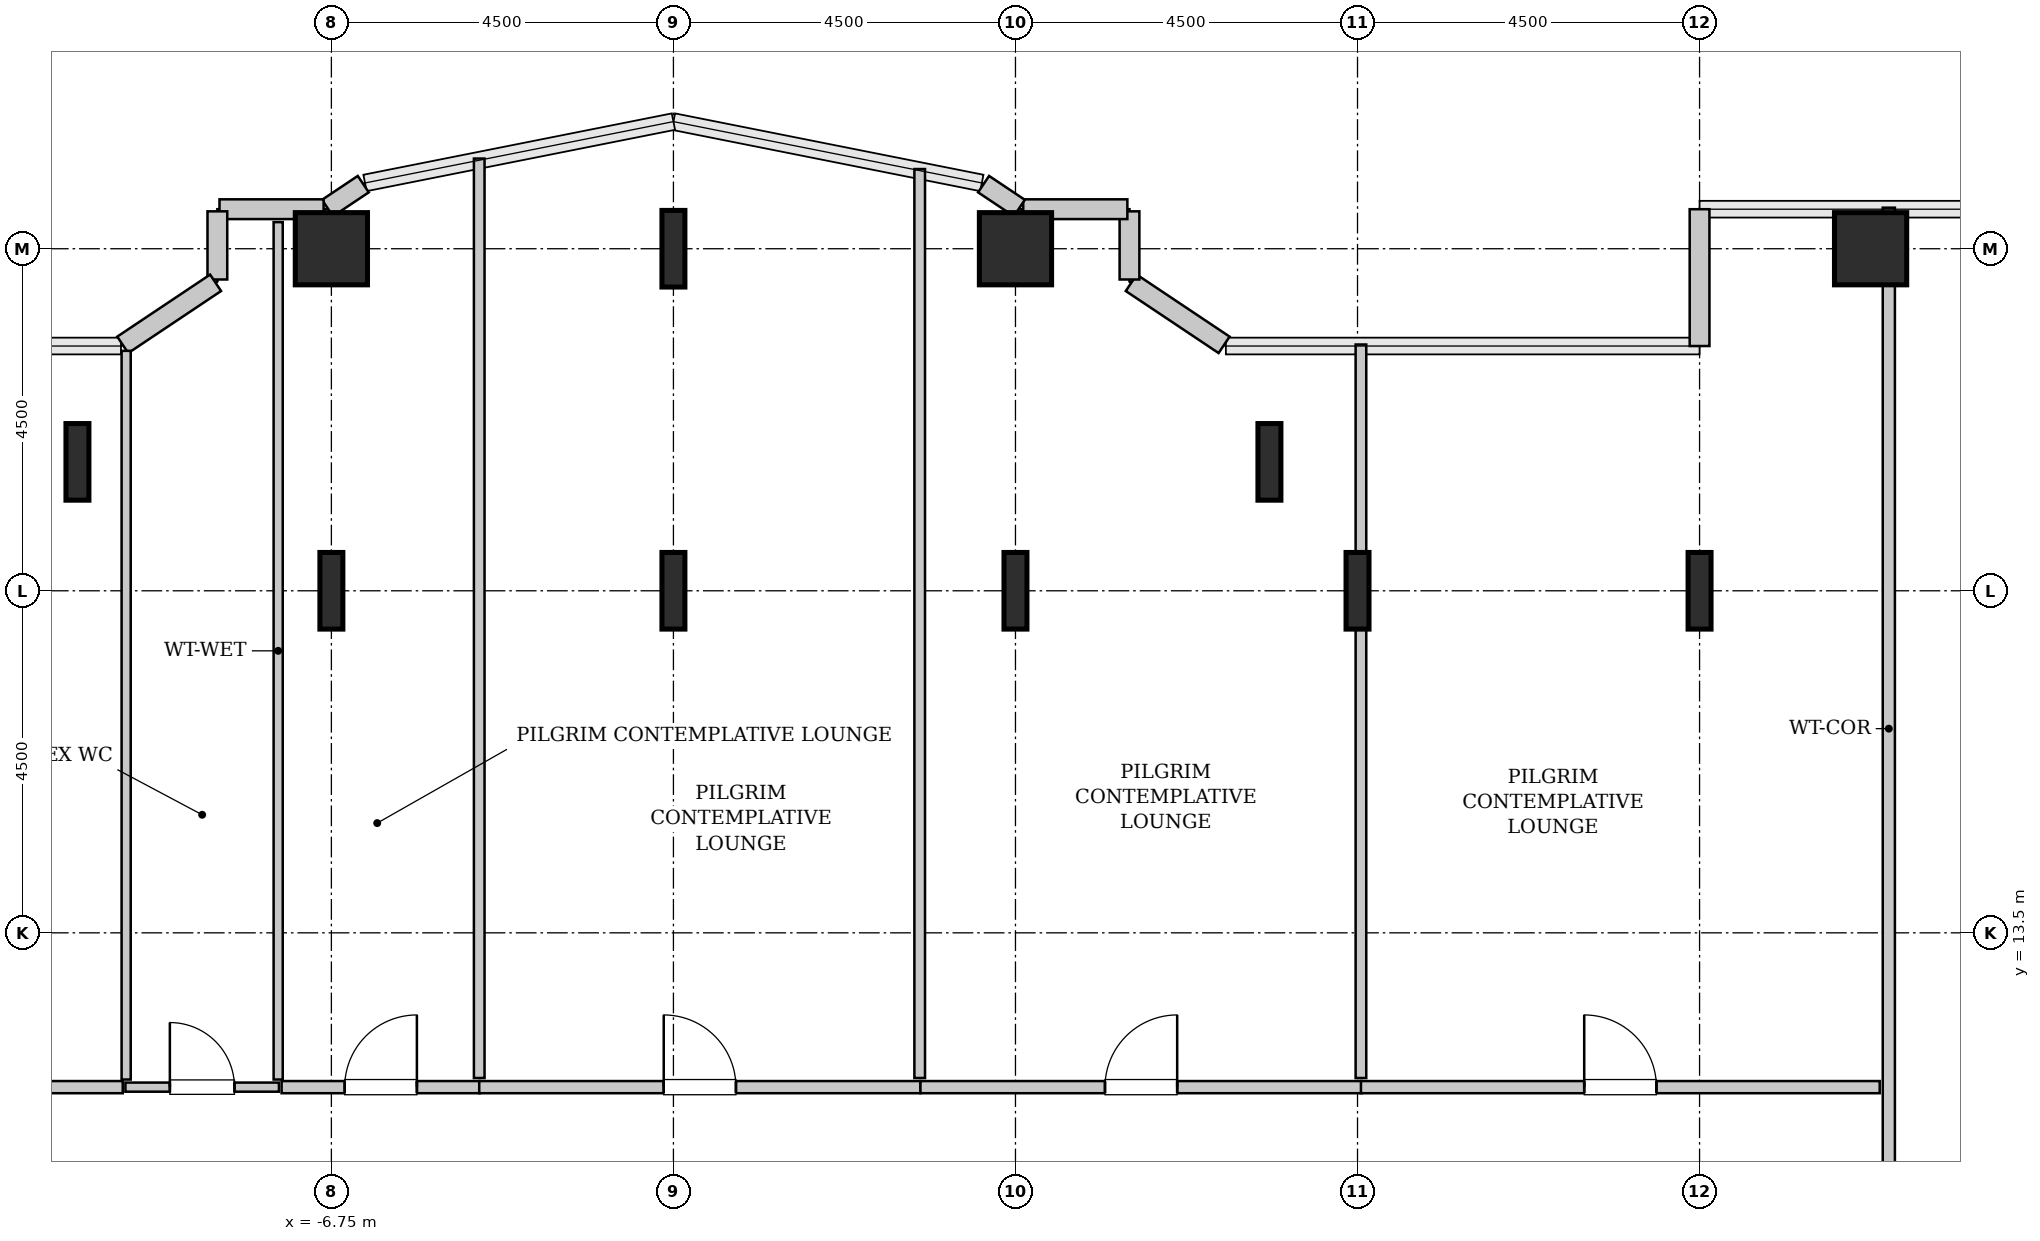
"""IFC4 building model, lengths in metres.
Left out: names, types, materials, properties, quantities, classifications, styles, units other than length and angle.
Written with IfcOpenShell. Run it as: python <this file> out.ifc"""

import sys

from ifc_helpers import new_model, si_unit, direction, frame, frame_2d, origin, origin_2d, place, context, subcontext, project, spatial, rectangle, hollow_rectangle, i_section, extrude, source, transform, mapped, element, fill, save


model = new_model("IFC4")
c1 = context("Model", 3, precision=1e-05, world=origin(), true_north=direction((0.0, 1.0)))
c2 = subcontext(c1, "Body", "Model", "MODEL_VIEW")
j1 = project(units=[si_unit("LENGTHUNIT", "METRE"), si_unit("PLANEANGLEUNIT", "RADIAN")], contexts=[c1])
p1 = place(None, origin())
s1 = spatial("IfcSite", under=j1, at=p1, CompositionType="ELEMENT")
p2 = place(p1, origin())
s2 = spatial("IfcBuilding", under=s1, at=p2, CompositionType="ELEMENT")
p3 = place(p2, frame((0.0, 0.0, 52.0)))
s3 = spatial("IfcBuildingStorey", under=s2, at=p3, CompositionType="ELEMENT", Elevation=52.0)
m1 = source(origin(), c2, "Body", "SweptSolid", [
    extrude(i_section(OverallWidth=0.302, OverallDepth=1.008, WebThickness=0.021, FlangeThickness=0.04, FilletRadius=0.03, at=origin_2d()), origin(), (0.0, 0.0, 1.0), 3.8),
])
for number, where, z_axis, x_axis in (
    (1, (-10.091, 19.696, 0.0), (0.0, 0.0, 1.0), (1.0, 0.0, 0.0)),
    (2, (-6.75, 18.0, 0.0), (0.0, 0.0, 1.0), (1.0, 0.0, 0.0)),
):
    element("IfcColumn", number, at=place(p3, frame(where, z_axis=z_axis, x_axis=x_axis)), inside=s3, PredefinedType="COLUMN", context=c2, shape_type="MappedRepresentation", body=[
        mapped(m1, transform((0.0, 0.0, 0.0), x_axis=(1.0, 0.0, 0.0), y_axis=(0.0, 1.0, 0.0), z_axis=(0.0, 0.0, 1.0), scale=1.0)),
    ])
m2 = source(origin(), c2, "Body", "SweptSolid", [
    extrude(hollow_rectangle(XDim=0.95, YDim=0.95, WallThickness=0.045, InnerFilletRadius=0.045, OuterFilletRadius=0.09, at=origin_2d()), origin(), (0.0, 0.0, 1.0), 3.8),
])
p4 = place(p3, frame((-6.75, 22.5, 0.0), z_axis=(0.0, 0.0, 1.0), x_axis=(1.0, 0.0, 0.0)))
e3 = element("IfcColumn", 3, at=p4, inside=s3, PredefinedType="COLUMN", context=c2, shape_type="MappedRepresentation", body=[
    mapped(m2, transform((0.0, 0.0, 0.0), x_axis=(1.0, 0.0, 0.0), y_axis=(0.0, 1.0, 0.0), z_axis=(0.0, 0.0, 1.0), scale=1.0)),
])
for number, where, z_axis, x_axis in (
    (4, (-2.25, 18.0, 0.0), (0.0, 0.0, 1.0), (1.0, 0.0, 0.0)),
    (5, (-2.25, 22.5, 0.0), (0.0, 0.0, 1.0), (1.0, 0.0, 0.0)),
    (6, (2.25, 18.0, 0.0), (0.0, 0.0, 1.0), (1.0, 0.0, 0.0)),
):
    element("IfcColumn", number, at=place(p3, frame(where, z_axis=z_axis, x_axis=x_axis)), inside=s3, PredefinedType="COLUMN", context=c2, shape_type="MappedRepresentation", body=[
        mapped(m1, transform((0.0, 0.0, 0.0), x_axis=(1.0, 0.0, 0.0), y_axis=(0.0, 1.0, 0.0), z_axis=(0.0, 0.0, 1.0), scale=1.0)),
    ])
p5 = place(p3, frame((2.25, 22.5, 0.0), z_axis=(0.0, 0.0, 1.0), x_axis=(1.0, 0.0, 0.0)))
e7 = element("IfcColumn", 7, at=p5, inside=s3, PredefinedType="COLUMN", context=c2, shape_type="MappedRepresentation", body=[
    mapped(m2, transform((0.0, 0.0, 0.0), x_axis=(1.0, 0.0, 0.0), y_axis=(0.0, 1.0, 0.0), z_axis=(0.0, 0.0, 1.0), scale=1.0)),
])
for number, where, z_axis, x_axis in (
    (8, (5.591, 19.696, 0.0), (0.0, 0.0, 1.0), (1.0, 0.0, 0.0)),
    (9, (6.75, 18.0, 0.0), (0.0, 0.0, 1.0), (1.0, 0.0, 0.0)),
    (10, (11.25, 18.0, 0.0), (0.0, 0.0, 1.0), (1.0, 0.0, 0.0)),
):
    element("IfcColumn", number, at=place(p3, frame(where, z_axis=z_axis, x_axis=x_axis)), inside=s3, PredefinedType="COLUMN", context=c2, shape_type="MappedRepresentation", body=[
        mapped(m1, transform((0.0, 0.0, 0.0), x_axis=(1.0, 0.0, 0.0), y_axis=(0.0, 1.0, 0.0), z_axis=(0.0, 0.0, 1.0), scale=1.0)),
    ])
p6 = place(p3, frame((13.5, 22.5, 0.0), z_axis=(0.0, 0.0, 1.0), x_axis=(1.0, 0.0, 0.0)))
e11 = element("IfcColumn", 11, at=p6, inside=s3, PredefinedType="COLUMN", context=c2, shape_type="MappedRepresentation", body=[
    mapped(m2, transform((0.0, 0.0, 0.0), x_axis=(1.0, 0.0, 0.0), y_axis=(0.0, 1.0, 0.0), z_axis=(0.0, 0.0, 1.0), scale=1.0)),
])
m3 = source(origin(), c2, "Body", "SweptSolid", [
    extrude(rectangle(XDim=1.8, YDim=0.26, at=frame_2d((0.9, 0.0))), origin(), (0.0, 0.0, 1.0), 3.55),
])
p7 = place(p3, frame((11.25, 23.02, 0.0), z_axis=(0.0, 0.0, 1.0), x_axis=(0.0, -1.0, 0.0)))
e12 = element("IfcWall", 12, at=p7, inside=s3, PredefinedType="SOLIDWALL", context=c2, shape_type="MappedRepresentation", body=[
    mapped(m3, transform((0.0, 0.0, 0.0), x_axis=(1.0, 0.0, 0.0), y_axis=(0.0, 1.0, 0.0), z_axis=(0.0, 0.0, 1.0), scale=1.0)),
])
m4 = source(origin(), c2, "Body", "SweptSolid", [
    extrude(rectangle(XDim=1.469, YDim=0.26, at=frame_2d((0.734, 0.0))), origin(), (0.0, 0.0, 1.0), 3.55),
])
p8 = place(p3, frame((4.995, 21.236, 0.0), z_axis=(0.0, 0.0, 1.0), x_axis=(-0.831461760506, 0.555581983884, 0.0)))
e13 = element("IfcWall", 13, at=p8, inside=s3, PredefinedType="SOLIDWALL", context=c2, shape_type="MappedRepresentation", body=[
    mapped(m4, transform((0.0, 0.0, 0.0), x_axis=(1.0, 0.0, 0.0), y_axis=(0.0, 1.0, 0.0), z_axis=(0.0, 0.0, 1.0), scale=1.0)),
])
m5 = source(origin(), c2, "Body", "SweptSolid", [
    extrude(rectangle(XDim=0.897, YDim=0.26, at=frame_2d((0.448, 0.0))), origin(), (0.0, 0.0, 1.0), 3.55),
])
p9 = place(p3, frame((3.75, 22.095, 0.0), z_axis=(0.0, 0.0, 1.0), x_axis=(0.0, 1.0, 0.0)))
e14 = element("IfcWall", 14, at=p9, inside=s3, PredefinedType="SOLIDWALL", context=c2, shape_type="MappedRepresentation", body=[
    mapped(m5, transform((0.0, 0.0, 0.0), x_axis=(1.0, 0.0, 0.0), y_axis=(0.0, 1.0, 0.0), z_axis=(0.0, 0.0, 1.0), scale=1.0)),
])
m6 = source(origin(), c2, "Body", "SweptSolid", [
    extrude(rectangle(XDim=1.37, YDim=0.26, at=frame_2d((0.685, 0.0))), origin(), (0.0, 0.0, 1.0), 3.55),
])
p10 = place(p3, frame((3.722, 23.02, 0.0), z_axis=(0.0, 0.0, 1.0), x_axis=(-1.0, 0.0, 0.0)))
e15 = element("IfcWall", 15, at=p10, inside=s3, PredefinedType="SOLIDWALL", context=c2, shape_type="MappedRepresentation", body=[
    mapped(m6, transform((0.0, 0.0, 0.0), x_axis=(1.0, 0.0, 0.0), y_axis=(0.0, 1.0, 0.0), z_axis=(0.0, 0.0, 1.0), scale=1.0)),
])
m7 = source(origin(), c2, "Body", "SweptSolid", [
    extrude(rectangle(XDim=0.565, YDim=0.26, at=frame_2d((0.283, 0.0))), origin(), (0.0, 0.0, 1.0), 3.55),
])
for number, where, z_axis, x_axis in (
    (16, (2.301, 23.036, 0.0), (0.0, 0.0, 1.0), (-0.832, 0.555, 0.0)),
    (17, (-6.331, 23.35, 0.0), (0.0, 0.0, 1.0), (-0.832, -0.555, 0.0)),
):
    element("IfcWall", number, at=place(p3, frame(where, z_axis=z_axis, x_axis=x_axis)), inside=s3, PredefinedType="SOLIDWALL", context=c2, shape_type="MappedRepresentation", body=[
        mapped(m7, transform((0.0, 0.0, 0.0), x_axis=(1.0, 0.0, 0.0), y_axis=(0.0, 1.0, 0.0), z_axis=(0.0, 0.0, 1.0), scale=1.0)),
    ])
p11 = place(p3, frame((-6.852, 23.02, 0.0), z_axis=(0.0, 0.0, 1.0), x_axis=(-1.0, 0.0, 0.0)))
e18 = element("IfcWall", 18, at=p11, inside=s3, PredefinedType="SOLIDWALL", context=c2, shape_type="MappedRepresentation", body=[
    mapped(m6, transform((0.0, 0.0, 0.0), x_axis=(1.0, 0.0, 0.0), y_axis=(0.0, 1.0, 0.0), z_axis=(0.0, 0.0, 1.0), scale=1.0)),
])
p12 = place(p3, frame((-8.25, 22.992, 0.0), z_axis=(0.0, 0.0, 1.0), x_axis=(0.0, -1.0, 0.0)))
e19 = element("IfcWall", 19, at=p12, inside=s3, PredefinedType="SOLIDWALL", context=c2, shape_type="MappedRepresentation", body=[
    mapped(m5, transform((0.0, 0.0, 0.0), x_axis=(1.0, 0.0, 0.0), y_axis=(0.0, 1.0, 0.0), z_axis=(0.0, 0.0, 1.0), scale=1.0)),
])
p13 = place(p3, frame((-8.273, 22.052, 0.0), z_axis=(0.0, 0.0, 1.0), x_axis=(-0.831461760506, -0.555581983884, 0.0)))
e20 = element("IfcWall", 20, at=p13, inside=s3, PredefinedType="SOLIDWALL", context=c2, shape_type="MappedRepresentation", body=[
    mapped(m4, transform((0.0, 0.0, 0.0), x_axis=(1.0, 0.0, 0.0), y_axis=(0.0, 1.0, 0.0), z_axis=(0.0, 0.0, 1.0), scale=1.0)),
])
m8 = source(origin(), c2, "Body", "SweptSolid", [
    extrude(rectangle(XDim=2.02, YDim=0.12, at=frame_2d((1.01, 0.0))), origin(), (0.0, 0.0, 1.0), 3.535),
])
p14 = place(p3, frame((-9.46, 11.47, 0.0), z_axis=(0.0, 0.0, 1.0), x_axis=(1.0, 0.0, 0.0)))
e21 = element("IfcWall", 21, at=p14, inside=s3, PredefinedType="PLUMBINGWALL", context=c2, shape_type="MappedRepresentation", body=[
    mapped(m8, transform((0.0, 0.0, 0.0), x_axis=(1.0, 0.0, 0.0), y_axis=(0.0, 1.0, 0.0), z_axis=(0.0, 0.0, 1.0), scale=1.0)),
])
p15 = place(p14, frame((0.585, 0.0, 0.0)))
e22 = element("IfcOpeningElement", 22, at=p15, cuts=e21, PredefinedType="OPENING", context=c2, shape_type="SweptSolid", body=[
    extrude(rectangle(XDim=0.85, YDim=2.1, at=frame_2d((0.425, 1.05))), frame((0.0, 0.07, 0.0), z_axis=(0.0, -1.0, 0.0), x_axis=(1.0, 0.0, 0.0)), (0.0, 0.0, 1.0), 0.14),
])
m9 = source(origin(), c2, "Body", "SweptSolid", [
    extrude(rectangle(XDim=11.28, YDim=0.12, at=frame_2d((5.64, 0.0))), origin(), (0.0, 0.0, 1.0), 3.535),
])
p16 = place(p3, frame((-7.45, 11.57, 0.0), z_axis=(0.0, 0.0, 1.0), x_axis=(0.0, 1.0, 0.0)))
e23 = element("IfcWall", 23, at=p16, inside=s3, PredefinedType="PLUMBINGWALL", context=c2, shape_type="MappedRepresentation", body=[
    mapped(m9, transform((0.0, 0.0, 0.0), x_axis=(1.0, 0.0, 0.0), y_axis=(0.0, 1.0, 0.0), z_axis=(0.0, 0.0, 1.0), scale=1.0)),
])
m10 = source(origin(), c2, "Body", "SweptSolid", [
    extrude(rectangle(XDim=9.587, YDim=0.12, at=frame_2d((4.793, 0.0))), origin(), (0.0, 0.0, 1.0), 3.535),
])
p17 = place(p3, frame((-9.45, 11.57, 0.0), z_axis=(0.0, 0.0, 1.0), x_axis=(0.0, 1.0, 0.0)))
e24 = element("IfcWall", 24, at=p17, inside=s3, PredefinedType="PLUMBINGWALL", context=c2, shape_type="MappedRepresentation", body=[
    mapped(m10, transform((0.0, 0.0, 0.0), x_axis=(1.0, 0.0, 0.0), y_axis=(0.0, 1.0, 0.0), z_axis=(0.0, 0.0, 1.0), scale=1.0)),
])
m11 = source(origin(), c2, "Body", "SweptSolid", [
    extrude(rectangle(XDim=16.735, YDim=0.16, at=frame_2d((8.368, 0.0))), origin(), (0.0, 0.0, 1.0), 3.535),
])
p18 = place(p3, frame((13.74, 6.305, 0.0), z_axis=(0.0, 0.0, 1.0), x_axis=(0.0, 1.0, 0.0)))
e25 = element("IfcWall", 25, at=p18, inside=s3, PredefinedType="PARTITIONING", context=c2, shape_type="MappedRepresentation", body=[
    mapped(m11, transform((0.0, 0.0, 0.0), x_axis=(1.0, 0.0, 0.0), y_axis=(0.0, 1.0, 0.0), z_axis=(0.0, 0.0, 1.0), scale=1.0)),
])
p19 = place(p18, frame((2.127, 0.0, 0.0)))
e26 = element("IfcOpeningElement", 26, at=p19, cuts=e25, PredefinedType="OPENING", context=c2, shape_type="SweptSolid", body=[
    extrude(rectangle(XDim=0.95, YDim=2.1, at=frame_2d((0.475, 1.05))), frame((0.0, 0.09, 0.0), z_axis=(0.0, -1.0, 0.0), x_axis=(1.0, 0.0, 0.0)), (0.0, 0.0, 1.0), 0.18),
])
m12 = source(origin(), c2, "Body", "SweptSolid", [
    extrude(rectangle(XDim=4.125, YDim=0.16, at=frame_2d((2.062, 0.0))), origin(), (0.0, 0.0, 1.0), 3.535),
])
p20 = place(p3, frame((-13.62, 11.47, 0.0), z_axis=(0.0, 0.0, 1.0), x_axis=(1.0, 0.0, 0.0)))
e27 = element("IfcWall", 27, at=p20, inside=s3, PredefinedType="PARTITIONING", context=c2, shape_type="MappedRepresentation", body=[
    mapped(m12, transform((0.0, 0.0, 0.0), x_axis=(1.0, 0.0, 0.0), y_axis=(0.0, 1.0, 0.0), z_axis=(0.0, 0.0, 1.0), scale=1.0)),
])
p21 = place(p20, frame((1.587, 0.0, 0.0)))
e28 = element("IfcOpeningElement", 28, at=p21, cuts=e27, PredefinedType="OPENING", context=c2, shape_type="SweptSolid", body=[
    extrude(rectangle(XDim=0.95, YDim=2.1, at=frame_2d((0.475, 1.05))), frame((0.0, 0.09, 0.0), z_axis=(0.0, -1.0, 0.0), x_axis=(1.0, 0.0, 0.0)), (0.0, 0.0, 1.0), 0.18),
])
m13 = source(origin(), c2, "Body", "SweptSolid", [
    extrude(rectangle(XDim=2.61, YDim=0.16, at=frame_2d((1.305, 0.0))), origin(), (0.0, 0.0, 1.0), 3.535),
])
p22 = place(p3, frame((-7.405, 11.47, 0.0), z_axis=(0.0, 0.0, 1.0), x_axis=(1.0, 0.0, 0.0)))
e29 = element("IfcWall", 29, at=p22, inside=s3, PredefinedType="PARTITIONING", context=c2, shape_type="MappedRepresentation", body=[
    mapped(m13, transform((0.0, 0.0, 0.0), x_axis=(1.0, 0.0, 0.0), y_axis=(0.0, 1.0, 0.0), z_axis=(0.0, 0.0, 1.0), scale=1.0)),
])
p23 = place(p22, frame((0.83, 0.0, 0.0)))
e30 = element("IfcOpeningElement", 30, at=p23, cuts=e29, PredefinedType="OPENING", context=c2, shape_type="SweptSolid", body=[
    extrude(rectangle(XDim=0.95, YDim=2.1, at=frame_2d((0.475, 1.05))), frame((0.0, 0.09, 0.0), z_axis=(0.0, -1.0, 0.0), x_axis=(1.0, 0.0, 0.0)), (0.0, 0.0, 1.0), 0.18),
])
m14 = source(origin(), c2, "Body", "SweptSolid", [
    extrude(rectangle(XDim=12.096, YDim=0.14, at=frame_2d((6.048, 0.0))), origin(), (0.0, 0.0, 1.0), 3.535),
])
p24 = place(p3, frame((-4.805, 11.59, 0.0), z_axis=(0.0, 0.0, 1.0), x_axis=(0.0, 1.0, 0.0)))
e31 = element("IfcWall", 31, at=p24, inside=s3, PredefinedType="PARTITIONING", context=c2, shape_type="MappedRepresentation", body=[
    mapped(m14, transform((0.0, 0.0, 0.0), x_axis=(1.0, 0.0, 0.0), y_axis=(0.0, 1.0, 0.0), z_axis=(0.0, 0.0, 1.0), scale=1.0)),
])
m15 = source(origin(), c2, "Body", "SweptSolid", [
    extrude(rectangle(XDim=5.805, YDim=0.16, at=frame_2d((2.902, 0.0))), origin(), (0.0, 0.0, 1.0), 3.535),
])
p25 = place(p3, frame((-4.805, 11.47, 0.0), z_axis=(0.0, 0.0, 1.0), x_axis=(1.0, 0.0, 0.0)))
e32 = element("IfcWall", 32, at=p25, inside=s3, PredefinedType="PARTITIONING", context=c2, shape_type="MappedRepresentation", body=[
    mapped(m15, transform((0.0, 0.0, 0.0), x_axis=(1.0, 0.0, 0.0), y_axis=(0.0, 1.0, 0.0), z_axis=(0.0, 0.0, 1.0), scale=1.0)),
])
p26 = place(p25, frame((2.427, 0.0, 0.0)))
e33 = element("IfcOpeningElement", 33, at=p26, cuts=e32, PredefinedType="OPENING", context=c2, shape_type="SweptSolid", body=[
    extrude(rectangle(XDim=0.95, YDim=2.1, at=frame_2d((0.475, 1.05))), frame((0.0, 0.09, 0.0), z_axis=(0.0, -1.0, 0.0), x_axis=(1.0, 0.0, 0.0)), (0.0, 0.0, 1.0), 0.18),
])
m16 = source(origin(), c2, "Body", "SweptSolid", [
    extrude(rectangle(XDim=11.958, YDim=0.14, at=frame_2d((5.979, 0.0))), origin(), (0.0, 0.0, 1.0), 3.535),
])
p27 = place(p3, frame((0.99, 11.59, 0.0), z_axis=(0.0, 0.0, 1.0), x_axis=(0.0, 1.0, 0.0)))
e34 = element("IfcWall", 34, at=p27, inside=s3, PredefinedType="PARTITIONING", context=c2, shape_type="MappedRepresentation", body=[
    mapped(m16, transform((0.0, 0.0, 0.0), x_axis=(1.0, 0.0, 0.0), y_axis=(0.0, 1.0, 0.0), z_axis=(0.0, 0.0, 1.0), scale=1.0)),
])
p28 = place(p3, frame((1.0, 11.47, 0.0), z_axis=(0.0, 0.0, 1.0), x_axis=(1.0, 0.0, 0.0)))
e35 = element("IfcWall", 35, at=p28, inside=s3, PredefinedType="PARTITIONING", context=c2, shape_type="MappedRepresentation", body=[
    mapped(m15, transform((0.0, 0.0, 0.0), x_axis=(1.0, 0.0, 0.0), y_axis=(0.0, 1.0, 0.0), z_axis=(0.0, 0.0, 1.0), scale=1.0)),
])
p29 = place(p28, frame((2.427, 0.0, 0.0)))
e36 = element("IfcOpeningElement", 36, at=p29, cuts=e35, PredefinedType="OPENING", context=c2, shape_type="SweptSolid", body=[
    extrude(rectangle(XDim=0.95, YDim=2.1, at=frame_2d((0.475, 1.05))), frame((0.0, 0.09, 0.0), z_axis=(0.0, -1.0, 0.0), x_axis=(1.0, 0.0, 0.0)), (0.0, 0.0, 1.0), 0.18),
])
m17 = source(origin(), c2, "Body", "SweptSolid", [
    extrude(rectangle(XDim=9.65, YDim=0.14, at=frame_2d((4.825, 0.0))), origin(), (0.0, 0.0, 1.0), 3.535),
])
p30 = place(p3, frame((6.795, 11.59, 0.0), z_axis=(0.0, 0.0, 1.0), x_axis=(0.0, 1.0, 0.0)))
e37 = element("IfcWall", 37, at=p30, inside=s3, PredefinedType="PARTITIONING", context=c2, shape_type="MappedRepresentation", body=[
    mapped(m17, transform((0.0, 0.0, 0.0), x_axis=(1.0, 0.0, 0.0), y_axis=(0.0, 1.0, 0.0), z_axis=(0.0, 0.0, 1.0), scale=1.0)),
])
m18 = source(origin(), c2, "Body", "SweptSolid", [
    extrude(rectangle(XDim=6.825, YDim=0.16, at=frame_2d((3.413, 0.0))), origin(), (0.0, 0.0, 1.0), 3.535),
])
p31 = place(p3, frame((6.795, 11.47, 0.0), z_axis=(0.0, 0.0, 1.0), x_axis=(1.0, 0.0, 0.0)))
e38 = element("IfcWall", 38, at=p31, inside=s3, PredefinedType="PARTITIONING", context=c2, shape_type="MappedRepresentation", body=[
    mapped(m18, transform((0.0, 0.0, 0.0), x_axis=(1.0, 0.0, 0.0), y_axis=(0.0, 1.0, 0.0), z_axis=(0.0, 0.0, 1.0), scale=1.0)),
])
p32 = place(p31, frame((2.938, 0.0, 0.0)))
e39 = element("IfcOpeningElement", 39, at=p32, cuts=e38, PredefinedType="OPENING", context=c2, shape_type="SweptSolid", body=[
    extrude(rectangle(XDim=0.95, YDim=2.1, at=frame_2d((0.475, 1.05))), frame((0.0, 0.09, 0.0), z_axis=(0.0, -1.0, 0.0), x_axis=(1.0, 0.0, 0.0)), (0.0, 0.0, 1.0), 0.18),
])
m19 = source(origin(), c2, "Body", "SweptSolid", [
    extrude(rectangle(XDim=0.85, YDim=2.1, at=frame_2d((0.425, 1.05))), frame((0.0, 0.025, 0.0), z_axis=(0.0, -1.0, 0.0), x_axis=(1.0, 0.0, 0.0)), (0.0, 0.0, 1.0), 0.05),
])
p33 = place(p15, origin())
e40 = element("IfcDoor", 40, at=p33, inside=s3, OperationType="SINGLE_SWING_LEFT", PredefinedType="DOOR", context=c2, shape_type="MappedRepresentation", body=[
    mapped(m19, transform((0.0, 0.0, 0.0), x_axis=(1.0, 0.0, 0.0), y_axis=(0.0, 1.0, 0.0), z_axis=(0.0, 0.0, 1.0), scale=1.0)),
])
fill(e22, e40)
m20 = source(origin(), c2, "Body", "SweptSolid", [
    extrude(rectangle(XDim=0.95, YDim=2.1, at=frame_2d((0.475, 1.05))), frame((0.0, 0.025, 0.0), z_axis=(0.0, -1.0, 0.0), x_axis=(1.0, 0.0, 0.0)), (0.0, 0.0, 1.0), 0.05),
])
p34 = place(p23, origin())
e41 = element("IfcDoor", 41, at=p34, inside=s3, OperationType="SINGLE_SWING_RIGHT", PredefinedType="DOOR", context=c2, shape_type="MappedRepresentation", body=[
    mapped(m20, transform((0.0, 0.0, 0.0), x_axis=(1.0, 0.0, 0.0), y_axis=(0.0, 1.0, 0.0), z_axis=(0.0, 0.0, 1.0), scale=1.0)),
])
fill(e30, e41)
p35 = place(p26, origin())
e42 = element("IfcDoor", 42, at=p35, inside=s3, OperationType="SINGLE_SWING_LEFT", PredefinedType="DOOR", context=c2, shape_type="MappedRepresentation", body=[
    mapped(m20, transform((0.0, 0.0, 0.0), x_axis=(1.0, 0.0, 0.0), y_axis=(0.0, 1.0, 0.0), z_axis=(0.0, 0.0, 1.0), scale=1.0)),
])
fill(e33, e42)
p36 = place(p29, origin())
e43 = element("IfcDoor", 43, at=p36, inside=s3, OperationType="SINGLE_SWING_RIGHT", PredefinedType="DOOR", context=c2, shape_type="MappedRepresentation", body=[
    mapped(m20, transform((0.0, 0.0, 0.0), x_axis=(1.0, 0.0, 0.0), y_axis=(0.0, 1.0, 0.0), z_axis=(0.0, 0.0, 1.0), scale=1.0)),
])
fill(e36, e43)
p37 = place(p32, origin())
e44 = element("IfcDoor", 44, at=p37, inside=s3, OperationType="SINGLE_SWING_LEFT", PredefinedType="DOOR", context=c2, shape_type="MappedRepresentation", body=[
    mapped(m20, transform((0.0, 0.0, 0.0), x_axis=(1.0, 0.0, 0.0), y_axis=(0.0, 1.0, 0.0), z_axis=(0.0, 0.0, 1.0), scale=1.0)),
])
fill(e39, e44)
save(model, sys.argv[1])
